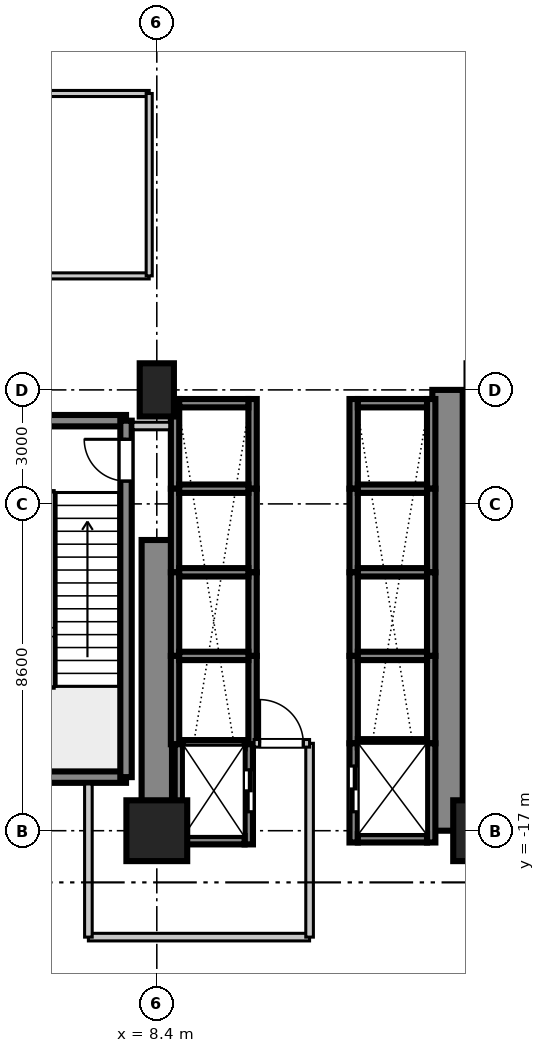
"""IFC4 building model, lengths in metres.
Left out: names, types, materials, properties, quantities, classifications, styles, units other than length and angle.
Written with IfcOpenShell. Run it as: python <this file> out.ifc"""

import sys

from ifc_helpers import new_model, si_unit, direction, frame, frame_2d, origin, origin_2d, place, context, subcontext, project, spatial, rectangle, extrude, source, transform, mapped, element, fill, save


model = new_model("IFC4")
c1 = context("Model", 3, precision=1e-05, world=origin(), true_north=direction((0.0, 1.0)))
c2 = subcontext(c1, "Body", "Model", "MODEL_VIEW")
j1 = project(units=[si_unit("LENGTHUNIT", "METRE"), si_unit("PLANEANGLEUNIT", "RADIAN")], contexts=[c1])
p1 = place(None, origin())
s1 = spatial("IfcSite", under=j1, at=p1, CompositionType="ELEMENT")
p2 = place(p1, origin())
s2 = spatial("IfcBuilding", under=s1, at=p2, CompositionType="ELEMENT")
p3 = place(p2, frame((0.0, 0.0, 16.2)))
s3 = spatial("IfcBuildingStorey", under=s2, at=p3, CompositionType="ELEMENT", Elevation=16.2)
m1 = source(origin(), c2, "Body", "SweptSolid", [
    extrude(rectangle(XDim=1.6, YDim=1.6, at=origin_2d()), origin(), (0.0, 0.0, 1.0), 5.355),
])
p4 = place(p3, frame((8.4, -17.0, 0.0), z_axis=(0.0, 0.0, 1.0), x_axis=(1.0, 0.0, 0.0)))
e1 = element("IfcColumn", 1, at=p4, inside=s3, PredefinedType="COLUMN", context=c2, shape_type="MappedRepresentation", body=[
    mapped(m1, transform((0.0, 0.0, 0.0), scale=1.0)),
])
m2 = source(origin(), c2, "Body", "SweptSolid", [
    extrude(rectangle(XDim=0.9, YDim=1.4, at=origin_2d()), origin(), (0.0, 0.0, 1.0), 5.355),
])
p5 = place(p3, frame((8.4, -5.4, 0.0), z_axis=(0.0, 0.0, 1.0), x_axis=(1.0, 0.0, 0.0)))
e2 = element("IfcColumn", 2, at=p5, inside=s3, PredefinedType="PILASTER", context=c2, shape_type="MappedRepresentation", body=[
    mapped(m2, transform((0.0, 0.0, 0.0), scale=1.0)),
])
p6 = place(p3, frame((17.0, -17.0, 0.0), z_axis=(0.0, 0.0, 1.0), x_axis=(1.0, 0.0, 0.0)))
e3 = element("IfcColumn", 3, at=p6, inside=s3, PredefinedType="COLUMN", context=c2, shape_type="MappedRepresentation", body=[
    mapped(m1, transform((0.0, 0.0, 0.0), scale=1.0)),
])
m3 = source(origin(), c2, "Body", "SweptSolid", [
    extrude(rectangle(XDim=7.65, YDim=0.8, at=frame_2d((3.825, 0.0))), origin(), (0.0, 0.0, 1.0), 5.08),
])
p7 = place(p3, frame((8.4, -17.0, 0.0), z_axis=(0.0, 0.0, 1.0), x_axis=(0.0, 1.0, 0.0)))
e4 = element("IfcWall", 4, at=p7, inside=s3, PredefinedType="SHEAR", context=c2, shape_type="MappedRepresentation", body=[
    mapped(m3, transform((0.0, 0.0, 0.0), scale=1.0)),
])
m4 = source(origin(), c2, "Body", "SweptSolid", [
    extrude(rectangle(XDim=11.6, YDim=0.8, at=frame_2d((5.8, 0.0))), origin(), (0.0, 0.0, 1.0), 5.08),
])
p8 = place(p3, frame((16.05, -17.0, 0.0), z_axis=(0.0, 0.0, 1.0), x_axis=(0.0, 1.0, 0.0)))
e5 = element("IfcWall", 5, at=p8, inside=s3, PredefinedType="SHEAR", context=c2, shape_type="MappedRepresentation", body=[
    mapped(m4, transform((0.0, 0.0, 0.0), scale=1.0)),
])
m5 = source(origin(), c2, "Body", "SweptSolid", [
    extrude(rectangle(XDim=3.98, YDim=0.3, at=frame_2d((1.99, 0.0))), origin(), (0.0, 0.0, 1.0), 5.08),
])
for number, where, z_axis, x_axis in (
    (6, (3.61, -15.59, 0.0), (0.0, 0.0, 1.0), (1.0, 0.0, 0.0)),
    (7, (3.61, -6.21, 0.0), (0.0, 0.0, 1.0), (1.0, 0.0, 0.0)),
):
    element("IfcWall", number, at=place(p3, frame(where, z_axis=z_axis, x_axis=x_axis)), inside=s3, PredefinedType="SHEAR", context=c2, shape_type="MappedRepresentation", body=[
        mapped(m5, transform((0.0, 0.0, 0.0), scale=1.0)),
    ])
m6 = source(origin(), c2, "Body", "SweptSolid", [
    extrude(rectangle(XDim=9.38, YDim=0.3, at=frame_2d((4.69, 0.0))), origin(), (0.0, 0.0, 1.0), 5.08),
])
p9 = place(p3, frame((7.59, -15.59, 0.0), z_axis=(0.0, 0.0, 1.0), x_axis=(0.0, 1.0, 0.0)))
e8 = element("IfcWall", 8, at=p9, inside=s3, PredefinedType="SHEAR", context=c2, shape_type="MappedRepresentation", body=[
    mapped(m6, transform((0.0, 0.0, 0.0), scale=1.0)),
])
p10 = place(p9, frame((7.79, 0.0, 0.0)))
e9 = element("IfcOpeningElement", 9, at=p10, cuts=e8, PredefinedType="OPENING", context=c2, shape_type="SweptSolid", body=[
    extrude(rectangle(XDim=1.1, YDim=2.15, at=frame_2d((0.55, 1.075))), frame((0.0, 0.16, 0.0), z_axis=(0.0, -1.0, 0.0), x_axis=(1.0, 0.0, 0.0)), (0.0, 0.0, 1.0), 0.32),
])
m7 = source(origin(), c2, "Body", "SweptSolid", [
    extrude(rectangle(XDim=2.36, YDim=0.22, at=frame_2d((1.18, 0.0))), origin(), (0.0, 0.0, 1.0), 5.08),
])
for number, where, z_axis, x_axis in (
    (10, (13.58, -8.0, 0.0), (0.0, 0.0, 1.0), (0.0, 1.0, 0.0)),
    (11, (15.62, -8.0, 0.0), (0.0, 0.0, 1.0), (0.0, 1.0, 0.0)),
):
    element("IfcWall", number, at=place(p3, frame(where, z_axis=z_axis, x_axis=x_axis)), inside=s3, PredefinedType="SHEAR", context=c2, shape_type="MappedRepresentation", body=[
        mapped(m7, transform((0.0, 0.0, 0.0), scale=1.0)),
    ])
m8 = source(origin(), c2, "Body", "SweptSolid", [
    extrude(rectangle(XDim=1.82, YDim=0.22, at=frame_2d((0.91, 0.0))), origin(), (0.0, 0.0, 1.0), 5.08),
])
p11 = place(p3, frame((13.69, -5.75, 0.0), z_axis=(0.0, 0.0, 1.0), x_axis=(1.0, 0.0, 0.0)))
e12 = element("IfcWall", 12, at=p11, inside=s3, PredefinedType="SHEAR", context=c2, shape_type="MappedRepresentation", body=[
    mapped(m8, transform((0.0, 0.0, 0.0), scale=1.0)),
])
m9 = source(origin(), c2, "Body", "SweptSolid", [
    extrude(rectangle(XDim=2.2, YDim=0.22, at=frame_2d((1.1, 0.0))), origin(), (0.0, 0.0, 1.0), 5.08),
])
for number, where, z_axis, x_axis in (
    (13, (13.58, -10.2, 0.0), (0.0, 0.0, 1.0), (0.0, 1.0, 0.0)),
    (14, (15.62, -10.2, 0.0), (0.0, 0.0, 1.0), (0.0, 1.0, 0.0)),
):
    element("IfcWall", number, at=place(p3, frame(where, z_axis=z_axis, x_axis=x_axis)), inside=s3, PredefinedType="SHEAR", context=c2, shape_type="MappedRepresentation", body=[
        mapped(m9, transform((0.0, 0.0, 0.0), scale=1.0)),
    ])
m10 = source(origin(), c2, "Body", "SweptSolid", [
    extrude(rectangle(XDim=1.82, YDim=0.22, at=frame_2d((0.91, 0.0))), origin(), (0.0, 0.0, 1.0), 5.4),
])
p12 = place(p3, frame((13.69, -8.0, 0.0), z_axis=(0.0, 0.0, 1.0), x_axis=(1.0, 0.0, 0.0)))
e15 = element("IfcWall", 15, at=p12, inside=s3, PredefinedType="SHEAR", context=c2, shape_type="MappedRepresentation", body=[
    mapped(m10, transform((0.0, 0.0, 0.0), scale=1.0)),
])
for number, where, z_axis, x_axis in (
    (16, (13.58, -12.4, 0.0), (0.0, 0.0, 1.0), (0.0, 1.0, 0.0)),
    (17, (15.62, -12.4, 0.0), (0.0, 0.0, 1.0), (0.0, 1.0, 0.0)),
):
    element("IfcWall", number, at=place(p3, frame(where, z_axis=z_axis, x_axis=x_axis)), inside=s3, PredefinedType="SHEAR", context=c2, shape_type="MappedRepresentation", body=[
        mapped(m9, transform((0.0, 0.0, 0.0), scale=1.0)),
    ])
p13 = place(p3, frame((13.69, -10.2, 0.0), z_axis=(0.0, 0.0, 1.0), x_axis=(1.0, 0.0, 0.0)))
e18 = element("IfcWall", 18, at=p13, inside=s3, PredefinedType="SHEAR", context=c2, shape_type="MappedRepresentation", body=[
    mapped(m10, transform((0.0, 0.0, 0.0), scale=1.0)),
])
m11 = source(origin(), c2, "Body", "SweptSolid", [
    extrude(rectangle(XDim=2.3, YDim=0.22, at=frame_2d((1.15, 0.0))), origin(), (0.0, 0.0, 1.0), 5.08),
])
for number, where, z_axis, x_axis in (
    (19, (13.58, -14.7, 0.0), (0.0, 0.0, 1.0), (0.0, 1.0, 0.0)),
    (20, (15.62, -14.7, 0.0), (0.0, 0.0, 1.0), (0.0, 1.0, 0.0)),
):
    element("IfcWall", number, at=place(p3, frame(where, z_axis=z_axis, x_axis=x_axis)), inside=s3, PredefinedType="SHEAR", context=c2, shape_type="MappedRepresentation", body=[
        mapped(m11, transform((0.0, 0.0, 0.0), scale=1.0)),
    ])
p14 = place(p3, frame((13.69, -12.4, 0.0), z_axis=(0.0, 0.0, 1.0), x_axis=(1.0, 0.0, 0.0)))
e21 = element("IfcWall", 21, at=p14, inside=s3, PredefinedType="SHEAR", context=c2, shape_type="MappedRepresentation", body=[
    mapped(m10, transform((0.0, 0.0, 0.0), scale=1.0)),
])
for number, where, z_axis, x_axis in (
    (22, (8.88, -8.0, 0.0), (0.0, 0.0, 1.0), (0.0, 1.0, 0.0)),
    (23, (10.92, -8.0, 0.0), (0.0, 0.0, 1.0), (0.0, 1.0, 0.0)),
):
    element("IfcWall", number, at=place(p3, frame(where, z_axis=z_axis, x_axis=x_axis)), inside=s3, PredefinedType="SHEAR", context=c2, shape_type="MappedRepresentation", body=[
        mapped(m7, transform((0.0, 0.0, 0.0), scale=1.0)),
    ])
p15 = place(p3, frame((8.99, -5.75, 0.0), z_axis=(0.0, 0.0, 1.0), x_axis=(1.0, 0.0, 0.0)))
e24 = element("IfcWall", 24, at=p15, inside=s3, PredefinedType="SHEAR", context=c2, shape_type="MappedRepresentation", body=[
    mapped(m8, transform((0.0, 0.0, 0.0), scale=1.0)),
])
for number, where, z_axis, x_axis in (
    (25, (8.88, -10.2, 0.0), (0.0, 0.0, 1.0), (0.0, 1.0, 0.0)),
    (26, (10.92, -10.2, 0.0), (0.0, 0.0, 1.0), (0.0, 1.0, 0.0)),
):
    element("IfcWall", number, at=place(p3, frame(where, z_axis=z_axis, x_axis=x_axis)), inside=s3, PredefinedType="SHEAR", context=c2, shape_type="MappedRepresentation", body=[
        mapped(m9, transform((0.0, 0.0, 0.0), scale=1.0)),
    ])
p16 = place(p3, frame((8.99, -8.0, 0.0), z_axis=(0.0, 0.0, 1.0), x_axis=(1.0, 0.0, 0.0)))
e27 = element("IfcWall", 27, at=p16, inside=s3, PredefinedType="SHEAR", context=c2, shape_type="MappedRepresentation", body=[
    mapped(m10, transform((0.0, 0.0, 0.0), scale=1.0)),
])
for number, where, z_axis, x_axis in (
    (28, (8.88, -12.4, 0.0), (0.0, 0.0, 1.0), (0.0, 1.0, 0.0)),
    (29, (10.92, -12.4, 0.0), (0.0, 0.0, 1.0), (0.0, 1.0, 0.0)),
):
    element("IfcWall", number, at=place(p3, frame(where, z_axis=z_axis, x_axis=x_axis)), inside=s3, PredefinedType="SHEAR", context=c2, shape_type="MappedRepresentation", body=[
        mapped(m9, transform((0.0, 0.0, 0.0), scale=1.0)),
    ])
p17 = place(p3, frame((8.99, -10.2, 0.0), z_axis=(0.0, 0.0, 1.0), x_axis=(1.0, 0.0, 0.0)))
e30 = element("IfcWall", 30, at=p17, inside=s3, PredefinedType="SHEAR", context=c2, shape_type="MappedRepresentation", body=[
    mapped(m10, transform((0.0, 0.0, 0.0), scale=1.0)),
])
m12 = source(origin(), c2, "Body", "SweptSolid", [
    extrude(rectangle(XDim=2.325, YDim=0.22, at=frame_2d((1.163, 0.0))), origin(), (0.0, 0.0, 1.0), 5.08),
])
for number, where, z_axis, x_axis in (
    (31, (8.88, -14.725, 0.0), (0.0, 0.0, 1.0), (0.0, 1.0, 0.0)),
    (32, (10.92, -14.725, 0.0), (0.0, 0.0, 1.0), (0.0, 1.0, 0.0)),
):
    element("IfcWall", number, at=place(p3, frame(where, z_axis=z_axis, x_axis=x_axis)), inside=s3, PredefinedType="SHEAR", context=c2, shape_type="MappedRepresentation", body=[
        mapped(m12, transform((0.0, 0.0, 0.0), scale=1.0)),
    ])
p18 = place(p3, frame((8.99, -12.4, 0.0), z_axis=(0.0, 0.0, 1.0), x_axis=(1.0, 0.0, 0.0)))
e33 = element("IfcWall", 33, at=p18, inside=s3, PredefinedType="SHEAR", context=c2, shape_type="MappedRepresentation", body=[
    mapped(m10, transform((0.0, 0.0, 0.0), scale=1.0)),
])
m13 = source(origin(), c2, "Body", "SweptSolid", [
    extrude(rectangle(XDim=2.635, YDim=0.22, at=frame_2d((1.317, 0.0))), origin(), (0.0, 0.0, 1.0), 5.08),
])
p19 = place(p3, frame((8.98, -17.36, 0.0), z_axis=(0.0, 0.0, 1.0), x_axis=(0.0, 1.0, 0.0)))
e34 = element("IfcWall", 34, at=p19, inside=s3, PredefinedType="SHEAR", context=c2, shape_type="MappedRepresentation", body=[
    mapped(m13, transform((0.0, 0.0, 0.0), scale=1.0)),
])
p20 = place(p3, frame((10.82, -17.36, 0.0), z_axis=(0.0, 0.0, 1.0), x_axis=(0.0, 1.0, 0.0)))
e35 = element("IfcWall", 35, at=p20, inside=s3, PredefinedType="SHEAR", context=c2, shape_type="MappedRepresentation", body=[
    mapped(m13, transform((0.0, 0.0, 0.0), scale=1.0)),
])
p21 = place(p20, frame((0.86, 0.0, 0.0)))
e36 = element("IfcOpeningElement", 36, at=p21, cuts=e35, PredefinedType="OPENING", context=c2, shape_type="SweptSolid", body=[
    extrude(rectangle(XDim=1.1, YDim=2.2, at=frame_2d((0.55, 1.1))), frame((0.0, 0.12, 0.0), z_axis=(0.0, -1.0, 0.0), x_axis=(1.0, 0.0, 0.0)), (0.0, 0.0, 1.0), 0.24),
])
m14 = source(origin(), c2, "Body", "SweptSolid", [
    extrude(rectangle(XDim=1.62, YDim=0.22, at=frame_2d((0.81, 0.0))), origin(), (0.0, 0.0, 1.0), 5.08),
])
p22 = place(p3, frame((9.09, -17.25, 0.0), z_axis=(0.0, 0.0, 1.0), x_axis=(1.0, 0.0, 0.0)))
e37 = element("IfcWall", 37, at=p22, inside=s3, PredefinedType="SHEAR", context=c2, shape_type="MappedRepresentation", body=[
    mapped(m14, transform((0.0, 0.0, 0.0), scale=1.0)),
])
m15 = source(origin(), c2, "Body", "SweptSolid", [
    extrude(rectangle(XDim=1.62, YDim=0.22, at=frame_2d((0.81, 0.0))), origin(), (0.0, 0.0, 1.0), 5.4),
])
p23 = place(p3, frame((9.09, -14.725, 0.0), z_axis=(0.0, 0.0, 1.0), x_axis=(1.0, 0.0, 0.0)))
e38 = element("IfcWall", 38, at=p23, inside=s3, PredefinedType="SHEAR", context=c2, shape_type="MappedRepresentation", body=[
    mapped(m15, transform((0.0, 0.0, 0.0), scale=1.0)),
])
m16 = source(origin(), c2, "Body", "SweptSolid", [
    extrude(rectangle(XDim=2.61, YDim=0.22, at=frame_2d((1.305, 0.0))), origin(), (0.0, 0.0, 1.0), 5.08),
])
p24 = place(p3, frame((13.58, -17.31, 0.0), z_axis=(0.0, 0.0, 1.0), x_axis=(0.0, 1.0, 0.0)))
e39 = element("IfcWall", 39, at=p24, inside=s3, PredefinedType="SHEAR", context=c2, shape_type="MappedRepresentation", body=[
    mapped(m16, transform((0.0, 0.0, 0.0), scale=1.0)),
])
p25 = place(p24, frame((0.81, 0.0, 0.0)))
e40 = element("IfcOpeningElement", 40, at=p25, cuts=e39, PredefinedType="OPENING", context=c2, shape_type="SweptSolid", body=[
    extrude(rectangle(XDim=1.2, YDim=2.2, at=frame_2d((0.6, 1.1))), frame((0.0, 0.12, 0.0), z_axis=(0.0, -1.0, 0.0), x_axis=(1.0, 0.0, 0.0)), (0.0, 0.0, 1.0), 0.24),
])
p26 = place(p3, frame((15.62, -17.31, 0.0), z_axis=(0.0, 0.0, 1.0), x_axis=(0.0, 1.0, 0.0)))
e41 = element("IfcWall", 41, at=p26, inside=s3, PredefinedType="SHEAR", context=c2, shape_type="MappedRepresentation", body=[
    mapped(m16, transform((0.0, 0.0, 0.0), scale=1.0)),
])
p27 = place(p3, frame((13.69, -17.2, 0.0), z_axis=(0.0, 0.0, 1.0), x_axis=(1.0, 0.0, 0.0)))
e42 = element("IfcWall", 42, at=p27, inside=s3, PredefinedType="SHEAR", context=c2, shape_type="MappedRepresentation", body=[
    mapped(m8, transform((0.0, 0.0, 0.0), scale=1.0)),
])
p28 = place(p3, frame((13.69, -14.7, 0.0), z_axis=(0.0, 0.0, 1.0), x_axis=(1.0, 0.0, 0.0)))
e43 = element("IfcWall", 43, at=p28, inside=s3, PredefinedType="SHEAR", context=c2, shape_type="MappedRepresentation", body=[
    mapped(m10, transform((0.0, 0.0, 0.0), scale=1.0)),
])
m17 = source(origin(), c2, "Body", "SweptSolid", [
    extrude(rectangle(XDim=5.82, YDim=0.2, at=frame_2d((2.91, 0.0))), origin(), (0.0, 0.0, 1.0), 3.4),
])
p29 = place(p3, frame((6.6, -19.8, 0.0), z_axis=(0.0, 0.0, 1.0), x_axis=(1.0, 0.0, 0.0)))
e44 = element("IfcWall", 44, at=p29, inside=s3, PredefinedType="PARTITIONING", context=c2, shape_type="MappedRepresentation", body=[
    mapped(m17, transform((0.0, 0.0, 0.0), scale=1.0)),
])
m18 = source(origin(), c2, "Body", "SweptSolid", [
    extrude(rectangle(XDim=4.03, YDim=0.2, at=frame_2d((2.015, 0.0))), origin(), (0.0, 0.0, 1.0), 3.4),
])
p30 = place(p3, frame((6.6, -19.8, 0.0), z_axis=(0.0, 0.0, 1.0), x_axis=(0.0, 1.0, 0.0)))
e45 = element("IfcWall", 45, at=p30, inside=s3, PredefinedType="PARTITIONING", context=c2, shape_type="MappedRepresentation", body=[
    mapped(m18, transform((0.0, 0.0, 0.0), scale=1.0)),
])
m19 = source(origin(), c2, "Body", "SweptSolid", [
    extrude(rectangle(XDim=5.1, YDim=0.2, at=frame_2d((2.55, 0.0))), origin(), (0.0, 0.0, 1.0), 3.4),
])
p31 = place(p3, frame((12.42, -19.8, 0.0), z_axis=(0.0, 0.0, 1.0), x_axis=(0.0, 1.0, 0.0)))
e46 = element("IfcWall", 46, at=p31, inside=s3, PredefinedType="PARTITIONING", context=c2, shape_type="MappedRepresentation", body=[
    mapped(m19, transform((0.0, 0.0, 0.0), scale=1.0)),
])
m20 = source(origin(), c2, "Body", "SweptSolid", [
    extrude(rectangle(XDim=1.46, YDim=0.2, at=frame_2d((0.73, 0.0))), origin(), (0.0, 0.0, 1.0), 3.4),
])
p32 = place(p3, frame((10.96, -14.7, 0.0), z_axis=(0.0, 0.0, 1.0), x_axis=(1.0, 0.0, 0.0)))
e47 = element("IfcWall", 47, at=p32, inside=s3, PredefinedType="PARTITIONING", context=c2, shape_type="MappedRepresentation", body=[
    mapped(m20, transform((0.0, 0.0, 0.0), scale=1.0)),
])
p33 = place(p32, frame((0.145, 0.0, 0.0)))
e48 = element("IfcOpeningElement", 48, at=p33, cuts=e47, PredefinedType="OPENING", context=c2, shape_type="SweptSolid", body=[
    extrude(rectangle(XDim=1.15, YDim=2.15, at=frame_2d((0.575, 1.075))), frame((0.0, 0.11, 0.0), z_axis=(0.0, -1.0, 0.0), x_axis=(1.0, 0.0, 0.0)), (0.0, 0.0, 1.0), 0.22),
])
m21 = source(origin(), c2, "Body", "SweptSolid", [
    extrude(rectangle(XDim=0.97, YDim=0.2, at=frame_2d((0.485, 0.0))), origin(), (0.0, 0.0, 1.0), 3.4),
])
p34 = place(p3, frame((7.77, -6.35, 0.0), z_axis=(0.0, 0.0, 1.0), x_axis=(1.0, 0.0, 0.0)))
e49 = element("IfcWall", 49, at=p34, inside=s3, PredefinedType="PARTITIONING", context=c2, shape_type="MappedRepresentation", body=[
    mapped(m21, transform((0.0, 0.0, 0.0), scale=1.0)),
])
m22 = source(origin(), c2, "Body", "SweptSolid", [
    extrude(rectangle(XDim=19.6, YDim=0.16, at=frame_2d((9.8, 0.0))), origin(), (0.0, 0.0, 1.0), 3.4),
])
p35 = place(p3, frame((-11.4, -2.4, 0.0), z_axis=(0.0, 0.0, 1.0), x_axis=(1.0, 0.0, 0.0)))
e50 = element("IfcWall", 50, at=p35, inside=s3, PredefinedType="PARTITIONING", context=c2, shape_type="MappedRepresentation", body=[
    mapped(m22, transform((0.0, 0.0, 0.0), scale=1.0)),
])
p36 = place(p3, frame((-11.4, 2.4, 0.0), z_axis=(0.0, 0.0, 1.0), x_axis=(1.0, 0.0, 0.0)))
e51 = element("IfcWall", 51, at=p36, inside=s3, PredefinedType="PARTITIONING", context=c2, shape_type="MappedRepresentation", body=[
    mapped(m22, transform((0.0, 0.0, 0.0), scale=1.0)),
])
p37 = place(p36, frame((10.601, 0.0, 0.0)))
e52 = element("IfcOpeningElement", 52, at=p37, cuts=e51, PredefinedType="OPENING", context=c2, shape_type="SweptSolid", body=[
    extrude(rectangle(XDim=1.5, YDim=2.15, at=frame_2d((0.75, 1.075))), frame((0.0, 0.09, 0.0), z_axis=(0.0, -1.0, 0.0), x_axis=(1.0, 0.0, 0.0)), (0.0, 0.0, 1.0), 0.18),
])
m23 = source(origin(), c2, "Body", "SweptSolid", [
    extrude(rectangle(XDim=4.8, YDim=0.16, at=frame_2d((2.4, 0.0))), origin(), (0.0, 0.0, 1.0), 3.4),
])
p38 = place(p3, frame((8.2, -2.4, 0.0), z_axis=(0.0, 0.0, 1.0), x_axis=(0.0, 1.0, 0.0)))
e53 = element("IfcWall", 53, at=p38, inside=s3, PredefinedType="PARTITIONING", context=c2, shape_type="MappedRepresentation", body=[
    mapped(m23, transform((0.0, 0.0, 0.0), scale=1.0)),
])
m24 = source(origin(), c2, "Body", "SweptSolid", [
    extrude(rectangle(XDim=1.1, YDim=2.15, at=frame_2d((0.55, 1.075))), frame((0.0, 0.025, 0.0), z_axis=(0.0, -1.0, 0.0), x_axis=(1.0, 0.0, 0.0)), (0.0, 0.0, 1.0), 0.05),
])
p39 = place(p10, origin())
e54 = element("IfcDoor", 54, at=p39, inside=s3, OperationType="SINGLE_SWING_RIGHT", PredefinedType="DOOR", context=c2, shape_type="MappedRepresentation", body=[
    mapped(m24, transform((0.0, 0.0, 0.0), scale=1.0)),
])
fill(e9, e54)
m25 = source(origin(), c2, "Body", "SweptSolid", [
    extrude(rectangle(XDim=1.1, YDim=2.2, at=frame_2d((0.55, 1.1))), frame((0.0, 0.025, 0.0), z_axis=(0.0, -1.0, 0.0), x_axis=(1.0, 0.0, 0.0)), (0.0, 0.0, 1.0), 0.05),
])
p40 = place(p21, frame((1.1, 0.0, 0.0), z_axis=(0.0, 0.0, 1.0), x_axis=(-1.0, 0.0, 0.0)))
e55 = element("IfcDoor", 55, at=p40, inside=s3, OperationType="DOUBLE_DOOR_SLIDING", PredefinedType="DOOR", context=c2, shape_type="MappedRepresentation", body=[
    mapped(m25, transform((0.0, 0.0, 0.0), scale=1.0)),
])
fill(e36, e55)
m26 = source(origin(), c2, "Body", "SweptSolid", [
    extrude(rectangle(XDim=1.2, YDim=2.2, at=frame_2d((0.6, 1.1))), frame((0.0, 0.025, 0.0), z_axis=(0.0, -1.0, 0.0), x_axis=(1.0, 0.0, 0.0)), (0.0, 0.0, 1.0), 0.05),
])
p41 = place(p25, origin())
e56 = element("IfcDoor", 56, at=p41, inside=s3, OperationType="DOUBLE_DOOR_SLIDING", PredefinedType="DOOR", context=c2, shape_type="MappedRepresentation", body=[
    mapped(m26, transform((0.0, 0.0, 0.0), scale=1.0)),
])
fill(e40, e56)
m27 = source(origin(), c2, "Body", "SweptSolid", [
    extrude(rectangle(XDim=1.15, YDim=2.15, at=frame_2d((0.575, 1.075))), frame((0.0, 0.025, 0.0), z_axis=(0.0, -1.0, 0.0), x_axis=(1.0, 0.0, 0.0)), (0.0, 0.0, 1.0), 0.05),
])
p42 = place(p33, origin())
e57 = element("IfcDoor", 57, at=p42, inside=s3, OperationType="SINGLE_SWING_LEFT", PredefinedType="DOOR", context=c2, shape_type="MappedRepresentation", body=[
    mapped(m27, transform((0.0, 0.0, 0.0), scale=1.0)),
])
fill(e48, e57)
save(model, sys.argv[1])
